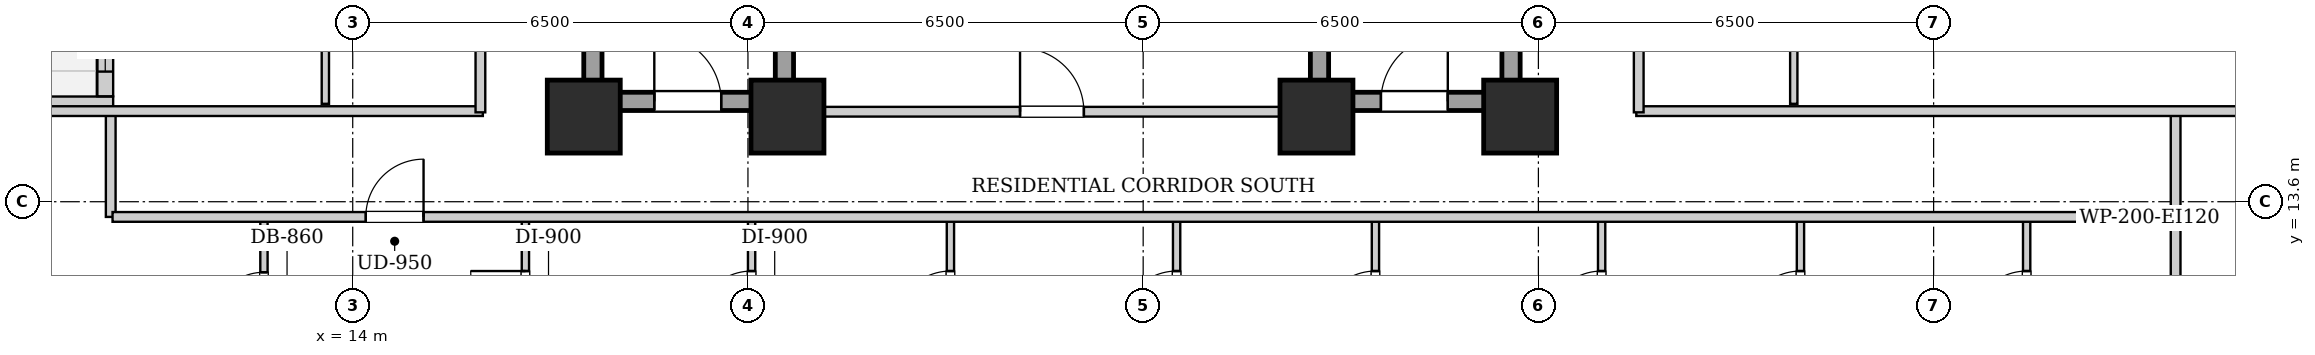
"""IFC4 building model, lengths in metres.
Left out: names, types, materials, properties, quantities, classifications, styles, units other than length and angle.
Written with IfcOpenShell. Run it as: python <this file> out.ifc"""

import sys

from ifc_helpers import new_model, si_unit, direction, frame, frame_2d, origin, origin_2d, place, context, subcontext, project, spatial, rectangle, extrude, element, fill, save


model = new_model("IFC4")
c1 = context("Model", 3, precision=1e-05, world=origin(), true_north=direction((0.0, 1.0)))
c2 = subcontext(c1, "Body", "Model", "MODEL_VIEW")
j1 = project(units=[si_unit("LENGTHUNIT", "METRE"), si_unit("PLANEANGLEUNIT", "RADIAN")], contexts=[c1])
p1 = place(None, origin())
s1 = spatial("IfcSite", under=j1, at=p1, CompositionType="ELEMENT")
p2 = place(p1, origin())
s2 = spatial("IfcBuilding", under=s1, at=p2, CompositionType="ELEMENT")
p3 = place(p2, frame((0.0, 0.0, 25.8)))
s3 = spatial("IfcBuildingStorey", under=s2, at=p3, CompositionType="ELEMENT", Elevation=25.8)
for number, where, z_axis, x_axis in (
    (1, (17.8, 15.0, 0.0), (0.0, 0.0, 1.0), (1.0, 0.0, 0.0)),
    (2, (21.15, 15.0, 0.0), (0.0, 0.0, 1.0), (1.0, 0.0, 0.0)),
    (3, (29.85, 15.0, 0.0), (0.0, 0.0, 1.0), (1.0, 0.0, 0.0)),
    (4, (33.2, 15.0, 0.0), (0.0, 0.0, 1.0), (1.0, 0.0, 0.0)),
):
    element("IfcColumn", number, at=place(p3, frame(where, z_axis=z_axis, x_axis=x_axis)), inside=s3, PredefinedType="COLUMN", context=c2, shape_type="SweptSolid", body=[
        extrude(rectangle(XDim=1.2, YDim=1.2, at=origin_2d()), origin(), (0.0, 0.0, 1.0), 3.2),
    ])
p4 = place(p3, frame((7.66, 15.2, 0.0), z_axis=(0.0, 0.0, 1.0), x_axis=(1.0, 0.0, 0.0)))
e5 = element("IfcWall", 5, at=p4, inside=s3, PredefinedType="SOLIDWALL", context=c2, shape_type="SweptSolid", body=[
    extrude(rectangle(XDim=2.4, YDim=0.26, at=frame_2d((1.2, 0.0))), origin(), (0.0, 0.0, 1.0), 2.94),
])
p5 = place(p3, frame((9.93, 15.334, 0.0), z_axis=(0.0, 0.0, 1.0), x_axis=(0.0, 1.0, 0.0)))
e6 = element("IfcWall", 6, at=p5, inside=s3, PredefinedType="SOLIDWALL", context=c2, shape_type="SweptSolid", body=[
    extrude(rectangle(XDim=3.932, YDim=0.26, at=frame_2d((1.966, 0.0))), origin(), (0.0, 0.0, 1.0), 2.94),
])
p6 = place(p5, frame((1.416, 0.0, 0.0)))
e7 = element("IfcOpeningElement", 7, at=p6, cuts=e6, PredefinedType="OPENING", context=c2, shape_type="SweptSolid", body=[
    extrude(rectangle(XDim=1.1, YDim=2.0, at=frame_2d((0.55, 1.0))), frame((0.0, 0.14, 0.0), z_axis=(0.0, -1.0, 0.0), x_axis=(1.0, 0.0, 0.0)), (0.0, 0.0, 1.0), 0.28),
])
p7 = place(p5, frame((0.406, 0.0, 0.55)))
e8 = element("IfcOpeningElement", 8, at=p7, cuts=e6, PredefinedType="OPENING", context=c2, shape_type="SweptSolid", body=[
    extrude(rectangle(XDim=0.85, YDim=1.2, at=frame_2d((0.425, 0.6))), frame((0.0, 0.14, 0.0), z_axis=(0.0, -1.0, 0.0), x_axis=(1.0, 0.0, 0.0)), (0.0, 0.0, 1.0), 0.28),
])
for number, where, z_axis, x_axis in (
    (9, (17.95, 15.1, 0.0), (0.0, 0.0, 1.0), (0.0, 1.0, 0.0)),
    (10, (21.1, 15.1, 0.0), (0.0, 0.0, 1.0), (0.0, 1.0, 0.0)),
):
    element("IfcWall", number, at=place(p3, frame(where, z_axis=z_axis, x_axis=x_axis)), inside=s3, PredefinedType="SHEAR", context=c2, shape_type="SweptSolid", body=[
        extrude(rectangle(XDim=9.0, YDim=0.3, at=frame_2d((4.5, 0.0))), origin(), (0.0, 0.0, 1.0), 2.94),
    ])
p8 = place(p3, frame((18.1, 15.25, 0.0), z_axis=(0.0, 0.0, 1.0), x_axis=(1.0, 0.0, 0.0)))
e11 = element("IfcWall", 11, at=p8, inside=s3, PredefinedType="SHEAR", context=c2, shape_type="SweptSolid", body=[
    extrude(rectangle(XDim=2.85, YDim=0.3, at=frame_2d((1.425, 0.0))), origin(), (0.0, 0.0, 1.0), 2.94),
])
p9 = place(p8, frame((0.86, 0.0, 0.0)))
e12 = element("IfcOpeningElement", 12, at=p9, cuts=e11, PredefinedType="OPENING", context=c2, shape_type="SweptSolid", body=[
    extrude(rectangle(XDim=1.1, YDim=2.05, at=frame_2d((0.55, 1.025))), frame((0.0, 0.16, 0.0), z_axis=(0.0, -1.0, 0.0), x_axis=(1.0, 0.0, 0.0)), (0.0, 0.0, 1.0), 0.32),
])
for number, where, z_axis, x_axis in (
    (13, (29.9, 15.1, 0.0), (0.0, 0.0, 1.0), (0.0, 1.0, 0.0)),
    (14, (33.05, 15.1, 0.0), (0.0, 0.0, 1.0), (0.0, 1.0, 0.0)),
):
    element("IfcWall", number, at=place(p3, frame(where, z_axis=z_axis, x_axis=x_axis)), inside=s3, PredefinedType="SHEAR", context=c2, shape_type="SweptSolid", body=[
        extrude(rectangle(XDim=9.0, YDim=0.3, at=frame_2d((4.5, 0.0))), origin(), (0.0, 0.0, 1.0), 2.94),
    ])
p10 = place(p3, frame((30.05, 15.25, 0.0), z_axis=(0.0, 0.0, 1.0), x_axis=(1.0, 0.0, 0.0)))
e15 = element("IfcWall", 15, at=p10, inside=s3, PredefinedType="SHEAR", context=c2, shape_type="SweptSolid", body=[
    extrude(rectangle(XDim=2.85, YDim=0.3, at=frame_2d((1.425, 0.0))), origin(), (0.0, 0.0, 1.0), 2.94),
])
p11 = place(p10, frame((0.86, 0.0, 0.0)))
e16 = element("IfcOpeningElement", 16, at=p11, cuts=e15, PredefinedType="OPENING", context=c2, shape_type="SweptSolid", body=[
    extrude(rectangle(XDim=1.1, YDim=2.05, at=frame_2d((0.55, 1.025))), frame((0.0, 0.16, 0.0), z_axis=(0.0, -1.0, 0.0), x_axis=(1.0, 0.0, 0.0)), (0.0, 0.0, 1.0), 0.32),
])
p12 = place(p3, frame((21.25, 15.08, 0.0), z_axis=(0.0, 0.0, 1.0), x_axis=(1.0, 0.0, 0.0)))
e17 = element("IfcWall", 17, at=p12, inside=s3, PredefinedType="PARTITIONING", context=c2, shape_type="SweptSolid", body=[
    extrude(rectangle(XDim=8.5, YDim=0.16, at=frame_2d((4.25, 0.0))), origin(), (0.0, 0.0, 1.0), 2.155),
])
p13 = place(p12, frame((3.725, 0.0, 0.0)))
e18 = element("IfcOpeningElement", 18, at=p13, cuts=e17, PredefinedType="OPENING", context=c2, shape_type="SweptSolid", body=[
    extrude(rectangle(XDim=1.05, YDim=2.05, at=frame_2d((0.525, 1.025))), frame((0.0, 0.09, 0.0), z_axis=(0.0, -1.0, 0.0), x_axis=(1.0, 0.0, 0.0)), (0.0, 0.0, 1.0), 0.18),
])
for number, where, z_axis, x_axis in (
    (19, (10.02, 13.35, 0.0), (0.0, 0.0, 1.0), (0.0, 1.0, 0.0)),
    (20, (43.98, 13.35, 0.0), (0.0, 0.0, 1.0), (0.0, 1.0, 0.0)),
):
    element("IfcWall", number, at=place(p3, frame(where, z_axis=z_axis, x_axis=x_axis)), inside=s3, PredefinedType="PARTITIONING", context=c2, shape_type="SweptSolid", body=[
        extrude(rectangle(XDim=1.74, YDim=0.16, at=frame_2d((0.87, 0.0))), origin(), (0.0, 0.0, 1.0), 2.94),
    ])
p14 = place(p3, frame((7.78, 15.09, 0.0), z_axis=(0.0, 0.0, 1.0), x_axis=(1.0, 0.0, 0.0)))
e21 = element("IfcWall", 21, at=p14, inside=s3, PredefinedType="PARTITIONING", context=c2, shape_type="SweptSolid", body=[
    extrude(rectangle(XDim=8.36, YDim=0.16, at=frame_2d((4.18, 0.0))), origin(), (0.0, 0.0, 1.0), 2.155),
])
p15 = place(p3, frame((35.11, 15.09, 0.0), z_axis=(0.0, 0.0, 1.0), x_axis=(1.0, 0.0, 0.0)))
e22 = element("IfcWall", 22, at=p15, inside=s3, PredefinedType="PARTITIONING", context=c2, shape_type="SweptSolid", body=[
    extrude(rectangle(XDim=11.11, YDim=0.16, at=frame_2d((5.555, 0.0))), origin(), (0.0, 0.0, 1.0), 2.155),
])
p16 = place(p3, frame((43.98, 10.65, 0.0), z_axis=(0.0, 0.0, 1.0), x_axis=(0.0, 1.0, 0.0)))
e23 = element("IfcWall", 23, at=p16, inside=s3, PredefinedType="PARTITIONING", context=c2, shape_type="SweptSolid", body=[
    extrude(rectangle(XDim=2.66, YDim=0.16, at=frame_2d((1.33, 0.0))), origin(), (0.0, 0.0, 1.0), 2.94),
])
p17 = place(p3, frame((12.54, 10.71, 0.0), z_axis=(0.0, 0.0, 1.0), x_axis=(0.0, 1.0, 0.0)))
e24 = element("IfcWall", 24, at=p17, inside=s3, PredefinedType="PARTITIONING", context=c2, shape_type="SweptSolid", body=[
    extrude(rectangle(XDim=2.6, YDim=0.12, at=frame_2d((1.3, 0.0))), origin(), (0.0, 0.0, 1.0), 2.94),
])
p18 = place(p17, frame((0.87, 0.0, 0.0)))
e25 = element("IfcOpeningElement", 25, at=p18, cuts=e24, PredefinedType="OPENING", context=c2, shape_type="SweptSolid", body=[
    extrude(rectangle(XDim=0.86, YDim=2.05, at=frame_2d((0.43, 1.025))), frame((0.0, 0.07, 0.0), z_axis=(0.0, -1.0, 0.0), x_axis=(1.0, 0.0, 0.0)), (0.0, 0.0, 1.0), 0.14),
])
p19 = place(p3, frame((16.84, 10.71, 0.0), z_axis=(0.0, 0.0, 1.0), x_axis=(0.0, 1.0, 0.0)))
e26 = element("IfcWall", 26, at=p19, inside=s3, PredefinedType="PARTITIONING", context=c2, shape_type="SweptSolid", body=[
    extrude(rectangle(XDim=2.6, YDim=0.12, at=frame_2d((1.3, 0.0))), origin(), (0.0, 0.0, 1.0), 2.94),
])
p20 = place(p19, frame((0.85, 0.0, 0.0)))
e27 = element("IfcOpeningElement", 27, at=p20, cuts=e26, PredefinedType="OPENING", context=c2, shape_type="SweptSolid", body=[
    extrude(rectangle(XDim=0.9, YDim=2.05, at=frame_2d((0.45, 1.025))), frame((0.0, 0.07, 0.0), z_axis=(0.0, -1.0, 0.0), x_axis=(1.0, 0.0, 0.0)), (0.0, 0.0, 1.0), 0.14),
])
p21 = place(p3, frame((20.56, 10.71, 0.0), z_axis=(0.0, 0.0, 1.0), x_axis=(0.0, 1.0, 0.0)))
e28 = element("IfcWall", 28, at=p21, inside=s3, PredefinedType="PARTITIONING", context=c2, shape_type="SweptSolid", body=[
    extrude(rectangle(XDim=2.6, YDim=0.12, at=frame_2d((1.3, 0.0))), origin(), (0.0, 0.0, 1.0), 2.94),
])
p22 = place(p21, frame((0.85, 0.0, 0.0)))
e29 = element("IfcOpeningElement", 29, at=p22, cuts=e28, PredefinedType="OPENING", context=c2, shape_type="SweptSolid", body=[
    extrude(rectangle(XDim=0.9, YDim=2.05, at=frame_2d((0.45, 1.025))), frame((0.0, 0.07, 0.0), z_axis=(0.0, -1.0, 0.0), x_axis=(1.0, 0.0, 0.0)), (0.0, 0.0, 1.0), 0.14),
])
p23 = place(p3, frame((23.83, 10.71, 0.0), z_axis=(0.0, 0.0, 1.0), x_axis=(0.0, 1.0, 0.0)))
e30 = element("IfcWall", 30, at=p23, inside=s3, PredefinedType="PARTITIONING", context=c2, shape_type="SweptSolid", body=[
    extrude(rectangle(XDim=2.6, YDim=0.12, at=frame_2d((1.3, 0.0))), origin(), (0.0, 0.0, 1.0), 2.94),
])
p24 = place(p23, frame((0.85, 0.0, 0.0)))
e31 = element("IfcOpeningElement", 31, at=p24, cuts=e30, PredefinedType="OPENING", context=c2, shape_type="SweptSolid", body=[
    extrude(rectangle(XDim=0.9, YDim=2.05, at=frame_2d((0.45, 1.025))), frame((0.0, 0.07, 0.0), z_axis=(0.0, -1.0, 0.0), x_axis=(1.0, 0.0, 0.0)), (0.0, 0.0, 1.0), 0.14),
])
p25 = place(p3, frame((27.55, 10.71, 0.0), z_axis=(0.0, 0.0, 1.0), x_axis=(0.0, 1.0, 0.0)))
e32 = element("IfcWall", 32, at=p25, inside=s3, PredefinedType="PARTITIONING", context=c2, shape_type="SweptSolid", body=[
    extrude(rectangle(XDim=2.6, YDim=0.12, at=frame_2d((1.3, 0.0))), origin(), (0.0, 0.0, 1.0), 2.94),
])
p26 = place(p25, frame((0.85, 0.0, 0.0)))
e33 = element("IfcOpeningElement", 33, at=p26, cuts=e32, PredefinedType="OPENING", context=c2, shape_type="SweptSolid", body=[
    extrude(rectangle(XDim=0.9, YDim=2.05, at=frame_2d((0.45, 1.025))), frame((0.0, 0.07, 0.0), z_axis=(0.0, -1.0, 0.0), x_axis=(1.0, 0.0, 0.0)), (0.0, 0.0, 1.0), 0.14),
])
p27 = place(p3, frame((30.82, 10.71, 0.0), z_axis=(0.0, 0.0, 1.0), x_axis=(0.0, 1.0, 0.0)))
e34 = element("IfcWall", 34, at=p27, inside=s3, PredefinedType="PARTITIONING", context=c2, shape_type="SweptSolid", body=[
    extrude(rectangle(XDim=2.6, YDim=0.12, at=frame_2d((1.3, 0.0))), origin(), (0.0, 0.0, 1.0), 2.94),
])
p28 = place(p27, frame((0.85, 0.0, 0.0)))
e35 = element("IfcOpeningElement", 35, at=p28, cuts=e34, PredefinedType="OPENING", context=c2, shape_type="SweptSolid", body=[
    extrude(rectangle(XDim=0.9, YDim=2.05, at=frame_2d((0.45, 1.025))), frame((0.0, 0.07, 0.0), z_axis=(0.0, -1.0, 0.0), x_axis=(1.0, 0.0, 0.0)), (0.0, 0.0, 1.0), 0.14),
])
p29 = place(p3, frame((34.54, 10.71, 0.0), z_axis=(0.0, 0.0, 1.0), x_axis=(0.0, 1.0, 0.0)))
e36 = element("IfcWall", 36, at=p29, inside=s3, PredefinedType="PARTITIONING", context=c2, shape_type="SweptSolid", body=[
    extrude(rectangle(XDim=2.6, YDim=0.12, at=frame_2d((1.3, 0.0))), origin(), (0.0, 0.0, 1.0), 2.94),
])
p30 = place(p29, frame((0.85, 0.0, 0.0)))
e37 = element("IfcOpeningElement", 37, at=p30, cuts=e36, PredefinedType="OPENING", context=c2, shape_type="SweptSolid", body=[
    extrude(rectangle(XDim=0.9, YDim=2.05, at=frame_2d((0.45, 1.025))), frame((0.0, 0.07, 0.0), z_axis=(0.0, -1.0, 0.0), x_axis=(1.0, 0.0, 0.0)), (0.0, 0.0, 1.0), 0.14),
])
p31 = place(p3, frame((37.81, 10.71, 0.0), z_axis=(0.0, 0.0, 1.0), x_axis=(0.0, 1.0, 0.0)))
e38 = element("IfcWall", 38, at=p31, inside=s3, PredefinedType="PARTITIONING", context=c2, shape_type="SweptSolid", body=[
    extrude(rectangle(XDim=2.6, YDim=0.12, at=frame_2d((1.3, 0.0))), origin(), (0.0, 0.0, 1.0), 2.94),
])
p32 = place(p31, frame((0.85, 0.0, 0.0)))
e39 = element("IfcOpeningElement", 39, at=p32, cuts=e38, PredefinedType="OPENING", context=c2, shape_type="SweptSolid", body=[
    extrude(rectangle(XDim=0.9, YDim=2.05, at=frame_2d((0.45, 1.025))), frame((0.0, 0.07, 0.0), z_axis=(0.0, -1.0, 0.0), x_axis=(1.0, 0.0, 0.0)), (0.0, 0.0, 1.0), 0.14),
])
p33 = place(p3, frame((41.53, 10.71, 0.0), z_axis=(0.0, 0.0, 1.0), x_axis=(0.0, 1.0, 0.0)))
e40 = element("IfcWall", 40, at=p33, inside=s3, PredefinedType="PARTITIONING", context=c2, shape_type="SweptSolid", body=[
    extrude(rectangle(XDim=2.6, YDim=0.12, at=frame_2d((1.3, 0.0))), origin(), (0.0, 0.0, 1.0), 2.94),
])
p34 = place(p33, frame((0.85, 0.0, 0.0)))
e41 = element("IfcOpeningElement", 41, at=p34, cuts=e40, PredefinedType="OPENING", context=c2, shape_type="SweptSolid", body=[
    extrude(rectangle(XDim=0.9, YDim=2.05, at=frame_2d((0.45, 1.025))), frame((0.0, 0.07, 0.0), z_axis=(0.0, -1.0, 0.0), x_axis=(1.0, 0.0, 0.0)), (0.0, 0.0, 1.0), 0.14),
])
for number, where, z_axis, x_axis in (
    (42, (13.55, 15.21, 0.0), (0.0, 0.0, 1.0), (0.0, 1.0, 0.0)),
    (43, (37.7, 15.21, 0.0), (0.0, 0.0, 1.0), (0.0, 1.0, 0.0)),
):
    element("IfcWall", number, at=place(p3, frame(where, z_axis=z_axis, x_axis=x_axis)), inside=s3, PredefinedType="PARTITIONING", context=c2, shape_type="SweptSolid", body=[
        extrude(rectangle(XDim=2.3, YDim=0.12, at=frame_2d((1.15, 0.0))), origin(), (0.0, 0.0, 1.0), 2.94),
    ])
p35 = place(p3, frame((10.05, 13.35, 0.0), z_axis=(0.0, 0.0, 1.0), x_axis=(1.0, 0.0, 0.0)))
e44 = element("IfcWall", 44, at=p35, inside=s3, PredefinedType="PARTITIONING", context=c2, shape_type="SweptSolid", body=[
    extrude(rectangle(XDim=33.9, YDim=0.16, at=frame_2d((16.95, 0.0))), origin(), (0.0, 0.0, 1.0), 2.94),
])
p36 = place(p35, frame((4.165, 0.0, 0.0)))
e45 = element("IfcOpeningElement", 45, at=p36, cuts=e44, PredefinedType="OPENING", context=c2, shape_type="SweptSolid", body=[
    extrude(rectangle(XDim=0.95, YDim=2.1, at=frame_2d((0.475, 1.05))), frame((0.0, 0.09, 0.0), z_axis=(0.0, -1.0, 0.0), x_axis=(1.0, 0.0, 0.0)), (0.0, 0.0, 1.0), 0.18),
])
p37 = place(p3, frame((16.1, 15.07, 0.0), z_axis=(0.0, 0.0, 1.0), x_axis=(0.0, 1.0, 0.0)))
e46 = element("IfcWall", 46, at=p37, inside=s3, PredefinedType="PARTITIONING", context=c2, shape_type="SweptSolid", body=[
    extrude(rectangle(XDim=13.93, YDim=0.16, at=frame_2d((6.965, 0.0))), origin(), (0.0, 0.0, 1.0), 2.94),
])
p38 = place(p37, frame((4.385, 0.0, 0.0)))
e47 = element("IfcOpeningElement", 47, at=p38, cuts=e46, PredefinedType="OPENING", context=c2, shape_type="SweptSolid", body=[
    extrude(rectangle(XDim=0.95, YDim=2.1, at=frame_2d((0.475, 1.05))), frame((0.0, 0.09, 0.0), z_axis=(0.0, -1.0, 0.0), x_axis=(1.0, 0.0, 0.0)), (0.0, 0.0, 1.0), 0.18),
])
p39 = place(p3, frame((35.15, 15.07, 0.0), z_axis=(0.0, 0.0, 1.0), x_axis=(0.0, 1.0, 0.0)))
e48 = element("IfcWall", 48, at=p39, inside=s3, PredefinedType="PARTITIONING", context=c2, shape_type="SweptSolid", body=[
    extrude(rectangle(XDim=13.93, YDim=0.16, at=frame_2d((6.965, 0.0))), origin(), (0.0, 0.0, 1.0), 2.94),
])
p40 = place(p39, frame((4.385, 0.0, 0.0)))
e49 = element("IfcOpeningElement", 49, at=p40, cuts=e48, PredefinedType="OPENING", context=c2, shape_type="SweptSolid", body=[
    extrude(rectangle(XDim=0.95, YDim=2.1, at=frame_2d((0.475, 1.05))), frame((0.0, 0.09, 0.0), z_axis=(0.0, -1.0, 0.0), x_axis=(1.0, 0.0, 0.0)), (0.0, 0.0, 1.0), 0.18),
])
p41 = place(p9, origin())
e50 = element("IfcDoor", 50, at=p41, inside=s3, OperationType="SINGLE_SWING_LEFT", PredefinedType="DOOR", context=c2, shape_type="SweptSolid", body=[
    extrude(rectangle(XDim=1.1, YDim=2.05, at=frame_2d((0.55, 1.025))), frame((0.0, 0.025, 0.0), z_axis=(0.0, -1.0, 0.0), x_axis=(1.0, 0.0, 0.0)), (0.0, 0.0, 1.0), 0.05),
])
fill(e12, e50)
p42 = place(p11, origin())
e51 = element("IfcDoor", 51, at=p42, inside=s3, OperationType="SINGLE_SWING_RIGHT", PredefinedType="DOOR", context=c2, shape_type="SweptSolid", body=[
    extrude(rectangle(XDim=1.1, YDim=2.05, at=frame_2d((0.55, 1.025))), frame((0.0, 0.025, 0.0), z_axis=(0.0, -1.0, 0.0), x_axis=(1.0, 0.0, 0.0)), (0.0, 0.0, 1.0), 0.05),
])
fill(e16, e51)
p43 = place(p13, origin())
e52 = element("IfcDoor", 52, at=p43, inside=s3, OperationType="SINGLE_SWING_LEFT", PredefinedType="DOOR", context=c2, shape_type="SweptSolid", body=[
    extrude(rectangle(XDim=1.05, YDim=2.05, at=frame_2d((0.525, 1.025))), frame((0.0, 0.025, 0.0), z_axis=(0.0, -1.0, 0.0), x_axis=(1.0, 0.0, 0.0)), (0.0, 0.0, 1.0), 0.05),
])
fill(e18, e52)
p44 = place(p18, origin())
e53 = element("IfcDoor", 53, at=p44, inside=s3, OperationType="SINGLE_SWING_LEFT", PredefinedType="DOOR", context=c2, shape_type="SweptSolid", body=[
    extrude(rectangle(XDim=0.86, YDim=2.05, at=frame_2d((0.43, 1.025))), frame((0.0, 0.025, 0.0), z_axis=(0.0, -1.0, 0.0), x_axis=(1.0, 0.0, 0.0)), (0.0, 0.0, 1.0), 0.05),
])
fill(e25, e53)
p45 = place(p20, origin())
e54 = element("IfcDoor", 54, at=p45, inside=s3, OperationType="SINGLE_SWING_RIGHT", PredefinedType="DOOR", context=c2, shape_type="SweptSolid", body=[
    extrude(rectangle(XDim=0.9, YDim=2.05, at=frame_2d((0.45, 1.025))), frame((0.0, 0.025, 0.0), z_axis=(0.0, -1.0, 0.0), x_axis=(1.0, 0.0, 0.0)), (0.0, 0.0, 1.0), 0.05),
])
fill(e27, e54)
p46 = place(p22, origin())
e55 = element("IfcDoor", 55, at=p46, inside=s3, OperationType="SINGLE_SWING_LEFT", PredefinedType="DOOR", context=c2, shape_type="SweptSolid", body=[
    extrude(rectangle(XDim=0.9, YDim=2.05, at=frame_2d((0.45, 1.025))), frame((0.0, 0.025, 0.0), z_axis=(0.0, -1.0, 0.0), x_axis=(1.0, 0.0, 0.0)), (0.0, 0.0, 1.0), 0.05),
])
fill(e29, e55)
p47 = place(p24, origin())
e56 = element("IfcDoor", 56, at=p47, inside=s3, OperationType="SINGLE_SWING_LEFT", PredefinedType="DOOR", context=c2, shape_type="SweptSolid", body=[
    extrude(rectangle(XDim=0.9, YDim=2.05, at=frame_2d((0.45, 1.025))), frame((0.0, 0.025, 0.0), z_axis=(0.0, -1.0, 0.0), x_axis=(1.0, 0.0, 0.0)), (0.0, 0.0, 1.0), 0.05),
])
fill(e31, e56)
p48 = place(p26, origin())
e57 = element("IfcDoor", 57, at=p48, inside=s3, OperationType="SINGLE_SWING_LEFT", PredefinedType="DOOR", context=c2, shape_type="SweptSolid", body=[
    extrude(rectangle(XDim=0.9, YDim=2.05, at=frame_2d((0.45, 1.025))), frame((0.0, 0.025, 0.0), z_axis=(0.0, -1.0, 0.0), x_axis=(1.0, 0.0, 0.0)), (0.0, 0.0, 1.0), 0.05),
])
fill(e33, e57)
p49 = place(p28, origin())
e58 = element("IfcDoor", 58, at=p49, inside=s3, OperationType="SINGLE_SWING_LEFT", PredefinedType="DOOR", context=c2, shape_type="SweptSolid", body=[
    extrude(rectangle(XDim=0.9, YDim=2.05, at=frame_2d((0.45, 1.025))), frame((0.0, 0.025, 0.0), z_axis=(0.0, -1.0, 0.0), x_axis=(1.0, 0.0, 0.0)), (0.0, 0.0, 1.0), 0.05),
])
fill(e35, e58)
p50 = place(p30, origin())
e59 = element("IfcDoor", 59, at=p50, inside=s3, OperationType="SINGLE_SWING_LEFT", PredefinedType="DOOR", context=c2, shape_type="SweptSolid", body=[
    extrude(rectangle(XDim=0.9, YDim=2.05, at=frame_2d((0.45, 1.025))), frame((0.0, 0.025, 0.0), z_axis=(0.0, -1.0, 0.0), x_axis=(1.0, 0.0, 0.0)), (0.0, 0.0, 1.0), 0.05),
])
fill(e37, e59)
p51 = place(p32, origin())
e60 = element("IfcDoor", 60, at=p51, inside=s3, OperationType="SINGLE_SWING_LEFT", PredefinedType="DOOR", context=c2, shape_type="SweptSolid", body=[
    extrude(rectangle(XDim=0.9, YDim=2.05, at=frame_2d((0.45, 1.025))), frame((0.0, 0.025, 0.0), z_axis=(0.0, -1.0, 0.0), x_axis=(1.0, 0.0, 0.0)), (0.0, 0.0, 1.0), 0.05),
])
fill(e39, e60)
p52 = place(p34, origin())
e61 = element("IfcDoor", 61, at=p52, inside=s3, OperationType="SINGLE_SWING_LEFT", PredefinedType="DOOR", context=c2, shape_type="SweptSolid", body=[
    extrude(rectangle(XDim=0.9, YDim=2.05, at=frame_2d((0.45, 1.025))), frame((0.0, 0.025, 0.0), z_axis=(0.0, -1.0, 0.0), x_axis=(1.0, 0.0, 0.0)), (0.0, 0.0, 1.0), 0.05),
])
fill(e41, e61)
p53 = place(p36, origin())
e62 = element("IfcDoor", 62, at=p53, inside=s3, OperationType="SINGLE_SWING_RIGHT", PredefinedType="DOOR", context=c2, shape_type="SweptSolid", body=[
    extrude(rectangle(XDim=0.95, YDim=2.1, at=frame_2d((0.475, 1.05))), frame((0.0, 0.025, 0.0), z_axis=(0.0, -1.0, 0.0), x_axis=(1.0, 0.0, 0.0)), (0.0, 0.0, 1.0), 0.05),
])
fill(e45, e62)
p54 = place(p7, origin())
e63 = element("IfcWindow", 63, at=p54, inside=s3, PartitioningType="SINGLE_PANEL", PredefinedType="WINDOW", context=c2, shape_type="SweptSolid", body=[
    extrude(rectangle(XDim=0.85, YDim=1.2, at=frame_2d((0.425, 0.6))), frame((0.0, 0.03, 0.0), z_axis=(0.0, -1.0, 0.0), x_axis=(1.0, 0.0, 0.0)), (0.0, 0.0, 1.0), 0.06),
])
fill(e8, e63)
save(model, sys.argv[1])
